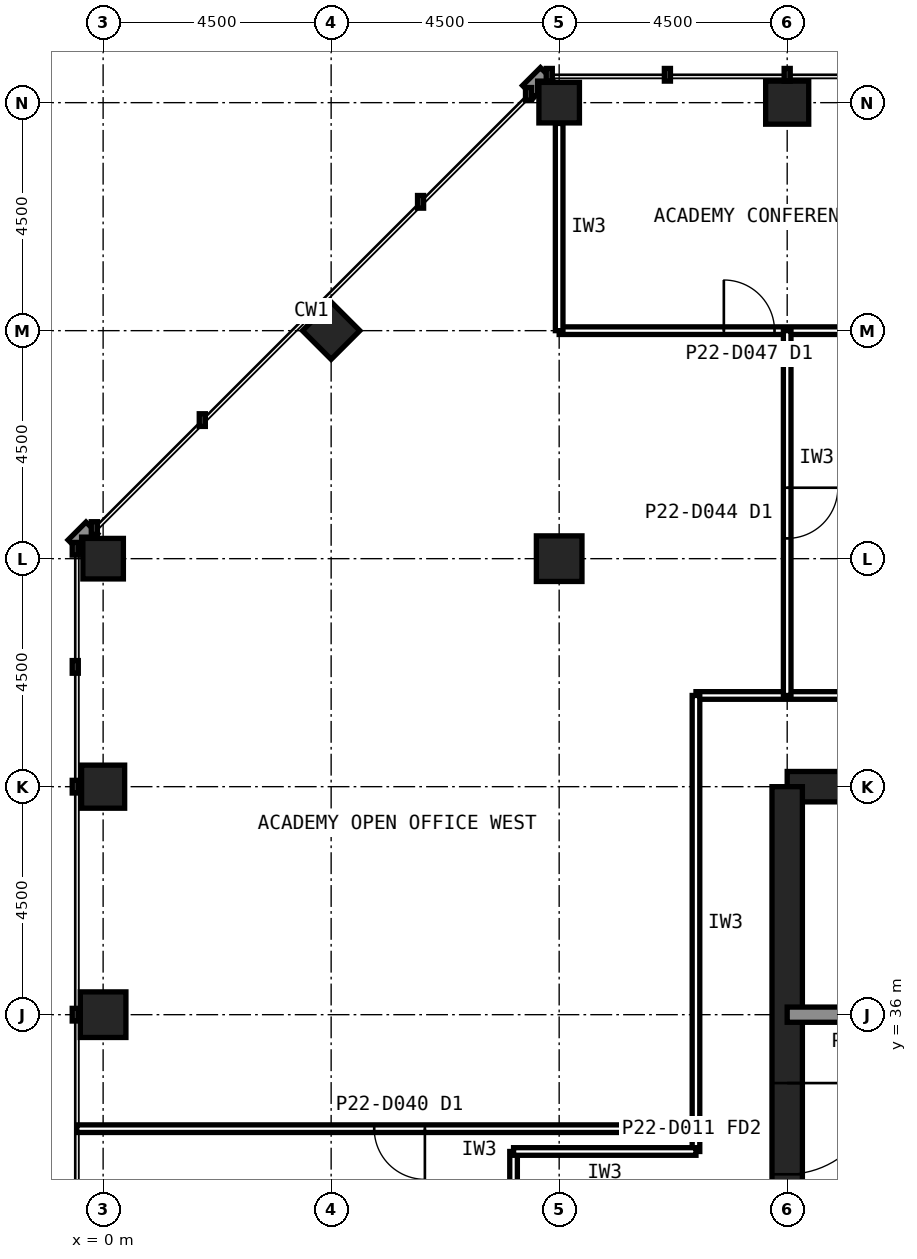
"""IFC4 building model, lengths in metres.
Left out: names, types, materials, properties, quantities, classifications, styles, units other than length and angle.
Written with IfcOpenShell. Run it as: python <this file> out.ifc"""

import sys

from ifc_helpers import new_model, si_unit, direction, frame, frame_2d, origin, origin_2d, place, context, subcontext, project, spatial, rectangle, hollow_rectangle, extrude, element, fill, save


model = new_model("IFC4")
c1 = context("Model", 3, precision=1e-05, world=origin(), true_north=direction((0.0, 1.0)))
c2 = subcontext(c1, "Body", "Model", "MODEL_VIEW")
j1 = project(units=[si_unit("LENGTHUNIT", "METRE"), si_unit("PLANEANGLEUNIT", "RADIAN")], contexts=[c1])
p1 = place(None, origin())
s1 = spatial("IfcSite", under=j1, at=p1, CompositionType="ELEMENT")
p2 = place(p1, origin())
s2 = spatial("IfcBuilding", under=s1, at=p2, CompositionType="ELEMENT")
p3 = place(p2, frame((0.0, 0.0, 96.2)))
s3 = spatial("IfcBuildingStorey", under=s2, at=p3, CompositionType="ELEMENT", Elevation=96.2)
p4 = place(p3, frame((13.5, 54.0, 0.0), z_axis=(0.0, 0.0, 1.0), x_axis=(1.0, 0.0, 0.0)))
e1 = element("IfcColumn", 1, at=p4, inside=s3, PredefinedType="COLUMN", context=c2, shape_type="SweptSolid", body=[
    extrude(hollow_rectangle(XDim=0.85, YDim=0.85, WallThickness=0.05, at=origin_2d()), origin(), (0.0, 0.0, 1.0), 4.2),
])
for number, where, z_axis, x_axis in (
    (2, (9.0, 54.0, 0.0), (0.0, 0.0, 1.0), (1.0, 0.0, 0.0)),
    (3, (0.0, 45.0, 0.0), (0.0, 0.0, 1.0), (1.0, 0.0, 0.0)),
):
    element("IfcColumn", number, at=place(p3, frame(where, z_axis=z_axis, x_axis=x_axis)), inside=s3, PredefinedType="COLUMN", context=c2, shape_type="SweptSolid", body=[
        extrude(hollow_rectangle(XDim=0.8, YDim=0.8, WallThickness=0.045, at=origin_2d()), origin(), (0.0, 0.0, 1.0), 4.2),
    ])
p5 = place(p3, frame((0.0, 40.5, 0.0), z_axis=(0.0, 0.0, 1.0), x_axis=(1.0, 0.0, 0.0)))
e4 = element("IfcColumn", 4, at=p5, inside=s3, PredefinedType="COLUMN", context=c2, shape_type="SweptSolid", body=[
    extrude(hollow_rectangle(XDim=0.85, YDim=0.85, WallThickness=0.05, at=origin_2d()), origin(), (0.0, 0.0, 1.0), 4.2),
])
p6 = place(p3, frame((0.0, 36.0, 0.0), z_axis=(0.0, 0.0, 1.0), x_axis=(1.0, 0.0, 0.0)))
e5 = element("IfcColumn", 5, at=p6, inside=s3, PredefinedType="COLUMN", context=c2, shape_type="SweptSolid", body=[
    extrude(hollow_rectangle(XDim=0.9, YDim=0.9, WallThickness=0.063, at=origin_2d()), origin(), (0.0, 0.0, 1.0), 4.2),
])
p7 = place(p3, frame((4.5, 49.5, 0.0), z_axis=(0.0, 0.0, 1.0), x_axis=(0.707106781187, 0.707106781187, 0.0)))
e6 = element("IfcColumn", 6, at=p7, inside=s3, PredefinedType="COLUMN", context=c2, shape_type="SweptSolid", body=[
    extrude(hollow_rectangle(XDim=0.8, YDim=0.8, WallThickness=0.045, at=origin_2d()), origin(), (0.0, 0.0, 1.0), 4.2),
])
p8 = place(p3, frame((9.0, 45.0, 0.0), z_axis=(0.0, 0.0, 1.0), x_axis=(1.0, 0.0, 0.0)))
e7 = element("IfcColumn", 7, at=p8, inside=s3, PredefinedType="COLUMN", context=c2, shape_type="SweptSolid", body=[
    extrude(hollow_rectangle(XDim=0.9, YDim=0.9, WallThickness=0.063, at=origin_2d()), origin(), (0.0, 0.0, 1.0), 4.2),
])
p9 = place(p3, frame((40.5, 40.5, 0.0), z_axis=(0.0, 0.0, 1.0), x_axis=(-1.0, 0.0, 0.0)))
e8 = element("IfcWall", 8, at=p9, inside=s3, PredefinedType="SHEAR", context=c2, shape_type="SweptSolid", body=[
    extrude(rectangle(XDim=27.0, YDim=0.6, at=frame_2d((13.5, 0.0))), origin(), (0.0, 0.0, 1.0), 4.2),
])
p10 = place(p3, frame((13.5, 40.5, 0.0), z_axis=(0.0, 0.0, 1.0), x_axis=(0.0, -1.0, 0.0)))
e9 = element("IfcWall", 9, at=p10, inside=s3, PredefinedType="SHEAR", context=c2, shape_type="SweptSolid", body=[
    extrude(rectangle(XDim=27.0, YDim=0.6, at=frame_2d((13.5, 0.0))), origin(), (0.0, 0.0, 1.0), 4.2),
])
p11 = place(p10, frame((19.65, 0.0, 0.0)))
e10 = element("IfcOpeningElement", 10, at=p11, cuts=e9, PredefinedType="OPENING", context=c2, shape_type="SweptSolid", body=[
    extrude(rectangle(XDim=1.2, YDim=2.1, at=frame_2d((0.6, 1.05))), frame((0.0, 0.31, 0.0), z_axis=(0.0, -1.0, 0.0), x_axis=(1.0, 0.0, 0.0)), (0.0, 0.0, 1.0), 0.62),
])
p12 = place(p10, frame((5.85, 0.0, 0.0)))
e11 = element("IfcOpeningElement", 11, at=p12, cuts=e9, PredefinedType="OPENING", context=c2, shape_type="SweptSolid", body=[
    extrude(rectangle(XDim=1.8, YDim=2.1, at=frame_2d((0.9, 1.05))), frame((0.0, 0.31, 0.0), z_axis=(0.0, -1.0, 0.0), x_axis=(1.0, 0.0, 0.0)), (0.0, 0.0, 1.0), 0.62),
])
p13 = place(p3, frame((13.5, 36.0, 0.0), z_axis=(0.0, 0.0, 1.0), x_axis=(1.0, 0.0, 0.0)))
e12 = element("IfcWall", 12, at=p13, inside=s3, PredefinedType="SOLIDWALL", context=c2, shape_type="SweptSolid", body=[
    extrude(rectangle(XDim=27.0, YDim=0.3, at=frame_2d((13.5, 0.0))), origin(), (0.0, 0.0, 1.0), 4.04),
])
p14 = place(p13, frame((1.8, 0.0, 0.0)))
e13 = element("IfcOpeningElement", 13, at=p14, cuts=e12, PredefinedType="OPENING", context=c2, shape_type="SweptSolid", body=[
    extrude(rectangle(XDim=0.9, YDim=2.1, at=frame_2d((0.45, 1.05))), frame((0.0, 0.16, 0.0), z_axis=(0.0, -1.0, 0.0), x_axis=(1.0, 0.0, 0.0)), (0.0, 0.0, 1.0), 0.32),
])
p15 = place(p13, frame((24.1, 0.0, 0.0)))
e14 = element("IfcOpeningElement", 14, at=p15, cuts=e12, PredefinedType="OPENING", context=c2, shape_type="SweptSolid", body=[
    extrude(rectangle(XDim=1.3, YDim=2.2, at=frame_2d((0.65, 1.1))), frame((0.0, 0.16, 0.0), z_axis=(0.0, -1.0, 0.0), x_axis=(1.0, 0.0, 0.0)), (0.0, 0.0, 1.0), 0.32),
])
p16 = place(p3, frame((42.3, 42.3, 0.0), z_axis=(0.0, 0.0, 1.0), x_axis=(-1.0, 0.0, 0.0)))
e15 = element("IfcWall", 15, at=p16, inside=s3, PredefinedType="PARTITIONING", context=c2, shape_type="SweptSolid", body=[
    extrude(rectangle(XDim=30.6, YDim=0.15, at=frame_2d((15.3, 0.0))), origin(), (0.0, 0.0, 1.0), 4.04),
])
p17 = place(p16, frame((14.8, 0.0, 0.0)))
e16 = element("IfcOpeningElement", 16, at=p17, cuts=e15, PredefinedType="OPENING", context=c2, shape_type="SweptSolid", body=[
    extrude(rectangle(XDim=1.0, YDim=2.1, at=frame_2d((0.5, 1.05))), frame((0.0, 0.085, 0.0), z_axis=(0.0, -1.0, 0.0), x_axis=(1.0, 0.0, 0.0)), (0.0, 0.0, 1.0), 0.17),
])
p18 = place(p3, frame((8.1, 33.3, 0.0), z_axis=(0.0, 0.0, 1.0), x_axis=(0.0, -1.0, 0.0)))
e17 = element("IfcWall", 17, at=p18, inside=s3, PredefinedType="PARTITIONING", context=c2, shape_type="SweptSolid", body=[
    extrude(rectangle(XDim=12.6, YDim=0.15, at=frame_2d((6.3, 0.0))), origin(), (0.0, 0.0, 1.0), 4.04),
])
p19 = place(p18, frame((5.8, 0.0, 0.0)))
e18 = element("IfcOpeningElement", 18, at=p19, cuts=e17, PredefinedType="OPENING", context=c2, shape_type="SweptSolid", body=[
    extrude(rectangle(XDim=1.0, YDim=2.1, at=frame_2d((0.5, 1.05))), frame((0.0, 0.085, 0.0), z_axis=(0.0, -1.0, 0.0), x_axis=(1.0, 0.0, 0.0)), (0.0, 0.0, 1.0), 0.17),
])
p20 = place(p3, frame((11.7, 42.3, 0.0), z_axis=(0.0, 0.0, 1.0), x_axis=(0.0, -1.0, 0.0)))
e19 = element("IfcWall", 19, at=p20, inside=s3, PredefinedType="PARTITIONING", context=c2, shape_type="SweptSolid", body=[
    extrude(rectangle(XDim=9.0, YDim=0.15, at=frame_2d((4.5, 0.0))), origin(), (0.0, 0.0, 1.0), 4.04),
])
p21 = place(p3, frame((11.7, 33.3, 0.0), z_axis=(0.0, 0.0, 1.0), x_axis=(-1.0, 0.0, 0.0)))
e20 = element("IfcWall", 20, at=p21, inside=s3, PredefinedType="PARTITIONING", context=c2, shape_type="SweptSolid", body=[
    extrude(rectangle(XDim=3.6, YDim=0.15, at=frame_2d((1.8, 0.0))), origin(), (0.0, 0.0, 1.0), 4.04),
])
p22 = place(p3, frame((9.0, 49.5, 0.0), z_axis=(0.0, 0.0, 1.0), x_axis=(1.0, 0.0, 0.0)))
e21 = element("IfcWall", 21, at=p22, inside=s3, PredefinedType="PARTITIONING", context=c2, shape_type="SweptSolid", body=[
    extrude(rectangle(XDim=9.0, YDim=0.15, at=frame_2d((4.5, 0.0))), origin(), (0.0, 0.0, 1.0), 4.04),
])
p23 = place(p22, frame((3.25, 0.0, 0.0)))
e22 = element("IfcOpeningElement", 22, at=p23, cuts=e21, PredefinedType="OPENING", context=c2, shape_type="SweptSolid", body=[
    extrude(rectangle(XDim=1.0, YDim=2.1, at=frame_2d((0.5, 1.05))), frame((0.0, 0.085, 0.0), z_axis=(0.0, -1.0, 0.0), x_axis=(1.0, 0.0, 0.0)), (0.0, 0.0, 1.0), 0.17),
])
p24 = place(p3, frame((9.0, 53.59, 0.0), z_axis=(0.0, 0.0, 1.0), x_axis=(0.0, -1.0, 0.0)))
e23 = element("IfcWall", 23, at=p24, inside=s3, PredefinedType="PARTITIONING", context=c2, shape_type="SweptSolid", body=[
    extrude(rectangle(XDim=4.09, YDim=0.15, at=frame_2d((2.045, 0.0))), origin(), (0.0, 0.0, 1.0), 3.429),
])
p25 = place(p3, frame((13.5, 49.5, 0.0), z_axis=(0.0, 0.0, 1.0), x_axis=(0.0, -1.0, 0.0)))
e24 = element("IfcWall", 24, at=p25, inside=s3, PredefinedType="PARTITIONING", context=c2, shape_type="SweptSolid", body=[
    extrude(rectangle(XDim=7.2, YDim=0.15, at=frame_2d((3.6, 0.0))), origin(), (0.0, 0.0, 1.0), 3.189),
])
p26 = place(p25, frame((3.1, 0.0, 0.0)))
e25 = element("IfcOpeningElement", 25, at=p26, cuts=e24, PredefinedType="OPENING", context=c2, shape_type="SweptSolid", body=[
    extrude(rectangle(XDim=1.0, YDim=2.1, at=frame_2d((0.5, 1.05))), frame((0.0, 0.085, 0.0), z_axis=(0.0, -1.0, 0.0), x_axis=(1.0, 0.0, 0.0)), (0.0, 0.0, 1.0), 0.17),
])
p27 = place(p3, frame((11.7, 33.75, 0.0), z_axis=(0.0, 0.0, 1.0), x_axis=(-1.0, 0.0, 0.0)))
e26 = element("IfcWall", 26, at=p27, inside=s3, PredefinedType="PARTITIONING", context=c2, shape_type="SweptSolid", body=[
    extrude(rectangle(XDim=12.22, YDim=0.15, at=frame_2d((6.11, 0.0))), origin(), (0.0, 0.0, 1.0), 4.04),
])
p28 = place(p27, frame((5.35, 0.0, 0.0)))
e27 = element("IfcOpeningElement", 27, at=p28, cuts=e26, PredefinedType="OPENING", context=c2, shape_type="SweptSolid", body=[
    extrude(rectangle(XDim=1.0, YDim=2.1, at=frame_2d((0.5, 1.05))), frame((0.0, 0.085, 0.0), z_axis=(0.0, -1.0, 0.0), x_axis=(1.0, 0.0, 0.0)), (0.0, 0.0, 1.0), 0.17),
])
p29 = place(p12, origin())
e28 = element("IfcDoor", 28, at=p29, inside=s3, OperationType="SINGLE_SWING_LEFT", PredefinedType="DOOR", context=c2, shape_type="SweptSolid", body=[
    extrude(rectangle(XDim=1.8, YDim=2.1, at=frame_2d((0.9, 1.05))), frame((0.0, 0.025, 0.0), z_axis=(0.0, -1.0, 0.0), x_axis=(1.0, 0.0, 0.0)), (0.0, 0.0, 1.0), 0.05),
])
fill(e11, e28)
p30 = place(p23, origin())
e29 = element("IfcDoor", 29, at=p30, inside=s3, OperationType="SINGLE_SWING_LEFT", PredefinedType="DOOR", context=c2, shape_type="SweptSolid", body=[
    extrude(rectangle(XDim=1.0, YDim=2.1, at=frame_2d((0.5, 1.05))), frame((0.0, 0.025, 0.0), z_axis=(0.0, -1.0, 0.0), x_axis=(1.0, 0.0, 0.0)), (0.0, 0.0, 1.0), 0.05),
])
fill(e22, e29)
p31 = place(p26, origin())
e30 = element("IfcDoor", 30, at=p31, inside=s3, OperationType="SINGLE_SWING_LEFT", PredefinedType="DOOR", context=c2, shape_type="SweptSolid", body=[
    extrude(rectangle(XDim=1.0, YDim=2.1, at=frame_2d((0.5, 1.05))), frame((0.0, 0.025, 0.0), z_axis=(0.0, -1.0, 0.0), x_axis=(1.0, 0.0, 0.0)), (0.0, 0.0, 1.0), 0.05),
])
fill(e25, e30)
p32 = place(p28, origin())
e31 = element("IfcDoor", 31, at=p32, inside=s3, OperationType="SINGLE_SWING_LEFT", PredefinedType="DOOR", context=c2, shape_type="SweptSolid", body=[
    extrude(rectangle(XDim=1.0, YDim=2.1, at=frame_2d((0.5, 1.05))), frame((0.0, 0.025, 0.0), z_axis=(0.0, -1.0, 0.0), x_axis=(1.0, 0.0, 0.0)), (0.0, 0.0, 1.0), 0.05),
])
fill(e27, e31)
save(model, sys.argv[1])
